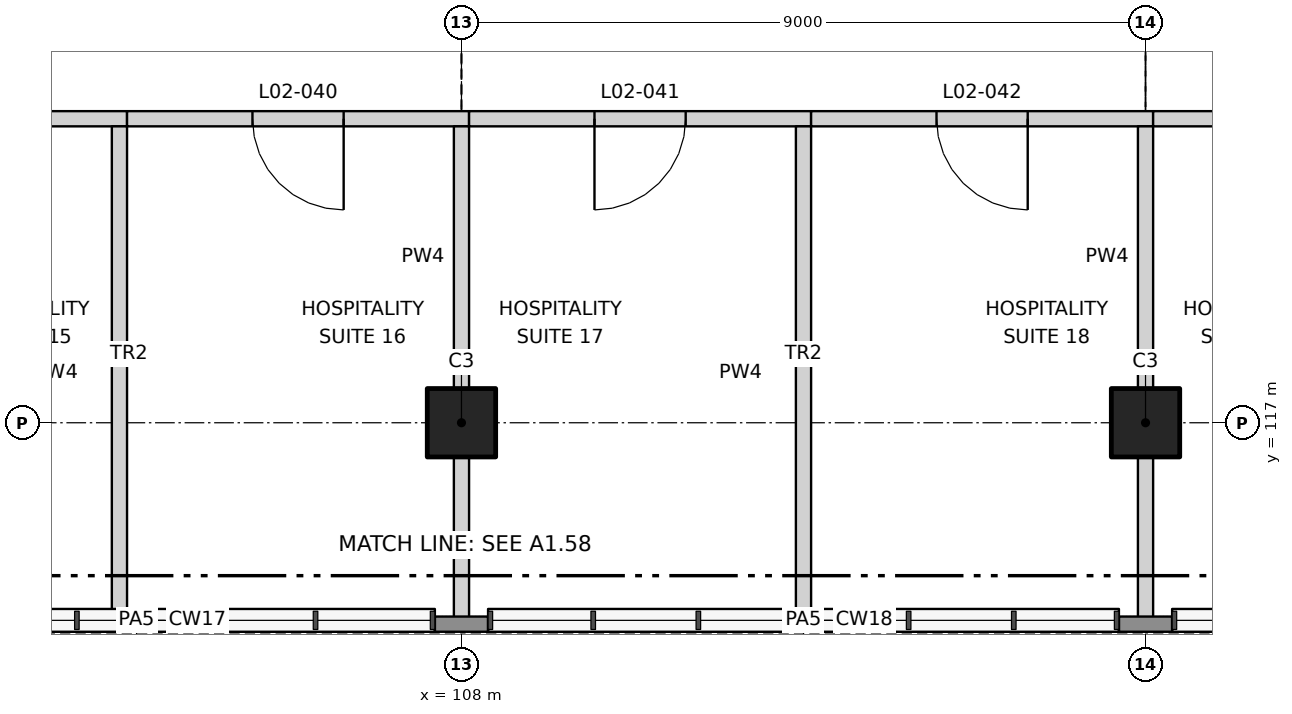
"""IFC4 building model, lengths in metres.
Left out: names, types, materials, properties, quantities, classifications, styles, units other than length and angle.
Written with IfcOpenShell. Run it as: python <this file> out.ifc"""

import sys

from ifc_helpers import new_model, si_unit, direction, frame, frame_2d, origin, origin_2d, place, context, subcontext, project, spatial, polyline, rectangle, outline, extrude, element, fill, save


model = new_model("IFC4")
c1 = context("Model", 3, precision=1e-05, world=origin(), true_north=direction((0.0, 1.0)))
c2 = subcontext(c1, "Body", "Model", "MODEL_VIEW")
j1 = project(units=[si_unit("LENGTHUNIT", "METRE"), si_unit("PLANEANGLEUNIT", "RADIAN")], contexts=[c1])
p1 = place(None, origin())
s1 = spatial("IfcSite", under=j1, at=p1, CompositionType="ELEMENT")
p2 = place(p1, origin())
s2 = spatial("IfcBuilding", under=s1, at=p2, CompositionType="ELEMENT")
p3 = place(p2, frame((0.0, 0.0, 11.5)))
s3 = spatial("IfcBuildingStorey", under=s2, at=p3, CompositionType="ELEMENT", Elevation=11.5)
for number, where, z_axis, x_axis in (
    (1, (108.0, 117.0, 0.0), (0.0, 0.0, 1.0), (1.0, 0.0, 0.0)),
    (2, (117.0, 117.0, 0.0), (0.0, 0.0, 1.0), (1.0, 0.0, 0.0)),
):
    element("IfcColumn", number, at=place(p3, frame(where, z_axis=z_axis, x_axis=x_axis)), inside=s3, PredefinedType="COLUMN", context=c2, shape_type="SweptSolid", body=[
        extrude(rectangle(XDim=0.9, YDim=0.9, at=origin_2d()), origin(), (0.0, 0.0, 1.0), 4.506),
    ])
p4 = place(p3, frame((98.9, 121.0, 0.0), z_axis=(0.0, 0.0, 1.0), x_axis=(1.0, 0.0, 0.0)))
e3 = element("IfcWall", 3, at=p4, inside=s3, PredefinedType="PARTITIONING", context=c2, shape_type="SweptSolid", body=[
    extrude(outline(polyline([(0.0, 0.0), (4.7, 0.0), (4.7, 8.258), (0.47, 8.258), (0.0, 10.5), (0.0, 0.0)])), frame((0.0, 0.1, 0.0), z_axis=(0.0, -1.0, 0.0), x_axis=(1.0, 0.0, 0.0)), (0.0, 0.0, 1.0), 0.2),
])
p5 = place(p4, frame((1.75, 0.0, 0.0)))
e4 = element("IfcOpeningElement", 4, at=p5, cuts=e3, PredefinedType="OPENING", context=c2, shape_type="SweptSolid", body=[
    extrude(rectangle(XDim=1.2, YDim=2.1, at=frame_2d((0.6, 1.05))), frame((0.0, 0.11, 0.0), z_axis=(0.0, -1.0, 0.0), x_axis=(1.0, 0.0, 0.0)), (0.0, 0.0, 1.0), 0.22),
])
p6 = place(p3, frame((103.6, 121.0, 0.0), z_axis=(0.0, 0.0, 1.0), x_axis=(1.0, 0.0, 0.0)))
e5 = element("IfcWall", 5, at=p6, inside=s3, PredefinedType="PARTITIONING", context=c2, shape_type="SweptSolid", body=[
    extrude(rectangle(XDim=4.5, YDim=0.2, at=frame_2d((2.25, 0.0))), origin(), (0.0, 0.0, 1.0), 8.258),
])
p7 = place(p6, frame((1.65, 0.0, 0.0)))
e6 = element("IfcOpeningElement", 6, at=p7, cuts=e5, PredefinedType="OPENING", context=c2, shape_type="SweptSolid", body=[
    extrude(rectangle(XDim=1.2, YDim=2.1, at=frame_2d((0.6, 1.05))), frame((0.0, 0.11, 0.0), z_axis=(0.0, -1.0, 0.0), x_axis=(1.0, 0.0, 0.0)), (0.0, 0.0, 1.0), 0.22),
])
p8 = place(p3, frame((108.1, 121.0, 0.0), z_axis=(0.0, 0.0, 1.0), x_axis=(1.0, 0.0, 0.0)))
e7 = element("IfcWall", 7, at=p8, inside=s3, PredefinedType="PARTITIONING", context=c2, shape_type="SweptSolid", body=[
    extrude(rectangle(XDim=4.5, YDim=0.2, at=frame_2d((2.25, 0.0))), origin(), (0.0, 0.0, 1.0), 8.258),
])
p9 = place(p8, frame((1.65, 0.0, 0.0)))
e8 = element("IfcOpeningElement", 8, at=p9, cuts=e7, PredefinedType="OPENING", context=c2, shape_type="SweptSolid", body=[
    extrude(rectangle(XDim=1.2, YDim=2.1, at=frame_2d((0.6, 1.05))), frame((0.0, 0.11, 0.0), z_axis=(0.0, -1.0, 0.0), x_axis=(1.0, 0.0, 0.0)), (0.0, 0.0, 1.0), 0.22),
])
p10 = place(p3, frame((112.6, 121.0, 0.0), z_axis=(0.0, 0.0, 1.0), x_axis=(1.0, 0.0, 0.0)))
e9 = element("IfcWall", 9, at=p10, inside=s3, PredefinedType="PARTITIONING", context=c2, shape_type="SweptSolid", body=[
    extrude(rectangle(XDim=4.5, YDim=0.2, at=frame_2d((2.25, 0.0))), origin(), (0.0, 0.0, 1.0), 8.258),
])
p11 = place(p10, frame((1.65, 0.0, 0.0)))
e10 = element("IfcOpeningElement", 10, at=p11, cuts=e9, PredefinedType="OPENING", context=c2, shape_type="SweptSolid", body=[
    extrude(rectangle(XDim=1.2, YDim=2.1, at=frame_2d((0.6, 1.05))), frame((0.0, 0.11, 0.0), z_axis=(0.0, -1.0, 0.0), x_axis=(1.0, 0.0, 0.0)), (0.0, 0.0, 1.0), 0.22),
])
p12 = place(p3, frame((117.1, 121.0, 0.0), z_axis=(0.0, 0.0, 1.0), x_axis=(1.0, 0.0, 0.0)))
e11 = element("IfcWall", 11, at=p12, inside=s3, PredefinedType="PARTITIONING", context=c2, shape_type="SweptSolid", body=[
    extrude(rectangle(XDim=4.5, YDim=0.2, at=frame_2d((2.25, 0.0))), origin(), (0.0, 0.0, 1.0), 8.258),
])
p13 = place(p12, frame((1.65, 0.0, 0.0)))
e12 = element("IfcOpeningElement", 12, at=p13, cuts=e11, PredefinedType="OPENING", context=c2, shape_type="SweptSolid", body=[
    extrude(rectangle(XDim=1.2, YDim=2.1, at=frame_2d((0.6, 1.05))), frame((0.0, 0.11, 0.0), z_axis=(0.0, -1.0, 0.0), x_axis=(1.0, 0.0, 0.0)), (0.0, 0.0, 1.0), 0.22),
])
p14 = place(p3, frame((103.5, 114.4, 0.0), z_axis=(0.0, 0.0, 1.0), x_axis=(0.0, 1.0, 0.0)))
e13 = element("IfcWall", 13, at=p14, inside=s3, PredefinedType="PARTITIONING", context=c2, shape_type="SweptSolid", body=[
    extrude(outline(polyline([(0.0, 0.0), (6.5, 0.0), (6.5, 8.195), (0.0, 4.133), (0.0, 0.0)])), frame((0.0, 0.1, 0.0), z_axis=(0.0, -1.0, 0.0), x_axis=(1.0, 0.0, 0.0)), (0.0, 0.0, 1.0), 0.2),
])
p15 = place(p3, frame((108.0, 114.4, 0.0), z_axis=(0.0, 0.0, 1.0), x_axis=(0.0, 1.0, 0.0)))
e14 = element("IfcWall", 14, at=p15, inside=s3, PredefinedType="PARTITIONING", context=c2, shape_type="SweptSolid", body=[
    extrude(outline(polyline([(0.0, 0.0), (2.15, 0.0), (2.15, 2.877), (0.071, 2.877), (0.0, 2.833), (0.0, 0.0)])), frame((0.0, 0.1, 0.0), z_axis=(0.0, -1.0, 0.0), x_axis=(1.0, 0.0, 0.0)), (0.0, 0.0, 1.0), 0.2),
])
p16 = place(p3, frame((108.0, 117.45, 0.0), z_axis=(0.0, 0.0, 1.0), x_axis=(0.0, 1.0, 0.0)))
e15 = element("IfcWall", 15, at=p16, inside=s3, PredefinedType="PARTITIONING", context=c2, shape_type="SweptSolid", body=[
    extrude(rectangle(XDim=3.45, YDim=0.2, at=frame_2d((1.725, 0.0))), origin(), (0.0, 0.0, 1.0), 4.439),
])
p17 = place(p3, frame((112.5, 114.4, 0.0), z_axis=(0.0, 0.0, 1.0), x_axis=(0.0, 1.0, 0.0)))
e16 = element("IfcWall", 16, at=p17, inside=s3, PredefinedType="PARTITIONING", context=c2, shape_type="SweptSolid", body=[
    extrude(outline(polyline([(0.0, 0.0), (6.5, 0.0), (6.5, 8.195), (0.0, 4.133), (0.0, 0.0)])), frame((0.0, 0.1, 0.0), z_axis=(0.0, -1.0, 0.0), x_axis=(1.0, 0.0, 0.0)), (0.0, 0.0, 1.0), 0.2),
])
p18 = place(p3, frame((117.0, 114.4, 0.0), z_axis=(0.0, 0.0, 1.0), x_axis=(0.0, 1.0, 0.0)))
e17 = element("IfcWall", 17, at=p18, inside=s3, PredefinedType="PARTITIONING", context=c2, shape_type="SweptSolid", body=[
    extrude(outline(polyline([(0.0, 0.0), (2.15, 0.0), (2.15, 2.877), (0.071, 2.877), (0.0, 2.833), (0.0, 0.0)])), frame((0.0, 0.1, 0.0), z_axis=(0.0, -1.0, 0.0), x_axis=(1.0, 0.0, 0.0)), (0.0, 0.0, 1.0), 0.2),
])
p19 = place(p3, frame((117.0, 117.45, 0.0), z_axis=(0.0, 0.0, 1.0), x_axis=(0.0, 1.0, 0.0)))
e18 = element("IfcWall", 18, at=p19, inside=s3, PredefinedType="PARTITIONING", context=c2, shape_type="SweptSolid", body=[
    extrude(rectangle(XDim=3.45, YDim=0.2, at=frame_2d((1.725, 0.0))), origin(), (0.0, 0.0, 1.0), 4.439),
])
p20 = place(p3, frame((99.8, 114.35, 0.0), z_axis=(0.0, 0.0, 1.0), x_axis=(1.0, 0.0, 0.0)))
e19 = element("IfcWall", 19, at=p20, inside=s3, PredefinedType="SOLIDWALL", context=c2, shape_type="SweptSolid", body=[
    extrude(rectangle(XDim=7.85, YDim=0.2, at=frame_2d((3.925, 0.0))), origin(), (0.0, 0.0, 1.0), 1.1),
])
p21 = place(p3, frame((108.35, 114.35, 0.0), z_axis=(0.0, 0.0, 1.0), x_axis=(1.0, 0.0, 0.0)))
e20 = element("IfcWall", 20, at=p21, inside=s3, PredefinedType="SOLIDWALL", context=c2, shape_type="SweptSolid", body=[
    extrude(rectangle(XDim=8.3, YDim=0.2, at=frame_2d((4.15, 0.0))), origin(), (0.0, 0.0, 1.0), 1.1),
])
p22 = place(p3, frame((117.35, 114.35, 0.0), z_axis=(0.0, 0.0, 1.0), x_axis=(1.0, 0.0, 0.0)))
e21 = element("IfcWall", 21, at=p22, inside=s3, PredefinedType="SOLIDWALL", context=c2, shape_type="SweptSolid", body=[
    extrude(rectangle(XDim=6.85, YDim=0.2, at=frame_2d((3.425, 0.0))), origin(), (0.0, 0.0, 1.0), 1.1),
])
for number, where, z_axis, x_axis in (
    (22, (107.65, 114.35, 0.0), (0.0, 0.0, 1.0), (1.0, 0.0, 0.0)),
    (23, (116.65, 114.35, 0.0), (0.0, 0.0, 1.0), (1.0, 0.0, 0.0)),
):
    element("IfcWall", number, at=place(p3, frame(where, z_axis=z_axis, x_axis=x_axis)), inside=s3, PredefinedType="SOLIDWALL", context=c2, shape_type="SweptSolid", body=[
        extrude(rectangle(XDim=0.7, YDim=0.2, at=frame_2d((0.35, 0.0))), origin(), (0.0, 0.0, 1.0), 4.034),
    ])
p23 = place(p7, frame((1.2, 0.0, 0.0), z_axis=(0.0, 0.0, 1.0), x_axis=(-1.0, 0.0, 0.0)))
e24 = element("IfcDoor", 24, at=p23, inside=s3, OperationType="SINGLE_SWING_LEFT", PredefinedType="DOOR", context=c2, shape_type="SweptSolid", body=[
    extrude(rectangle(XDim=1.2, YDim=2.1, at=frame_2d((0.6, 1.05))), frame((0.0, 0.025, 0.0), z_axis=(0.0, -1.0, 0.0), x_axis=(1.0, 0.0, 0.0)), (0.0, 0.0, 1.0), 0.05),
])
fill(e6, e24)
p24 = place(p9, frame((1.2, 0.0, 0.0), z_axis=(0.0, 0.0, 1.0), x_axis=(-1.0, 0.0, 0.0)))
e25 = element("IfcDoor", 25, at=p24, inside=s3, OperationType="SINGLE_SWING_RIGHT", PredefinedType="DOOR", context=c2, shape_type="SweptSolid", body=[
    extrude(rectangle(XDim=1.2, YDim=2.1, at=frame_2d((0.6, 1.05))), frame((0.0, 0.025, 0.0), z_axis=(0.0, -1.0, 0.0), x_axis=(1.0, 0.0, 0.0)), (0.0, 0.0, 1.0), 0.05),
])
fill(e8, e25)
p25 = place(p11, frame((1.2, 0.0, 0.0), z_axis=(0.0, 0.0, 1.0), x_axis=(-1.0, 0.0, 0.0)))
e26 = element("IfcDoor", 26, at=p25, inside=s3, OperationType="SINGLE_SWING_LEFT", PredefinedType="DOOR", context=c2, shape_type="SweptSolid", body=[
    extrude(rectangle(XDim=1.2, YDim=2.1, at=frame_2d((0.6, 1.05))), frame((0.0, 0.025, 0.0), z_axis=(0.0, -1.0, 0.0), x_axis=(1.0, 0.0, 0.0)), (0.0, 0.0, 1.0), 0.05),
])
fill(e10, e26)
save(model, sys.argv[1])
